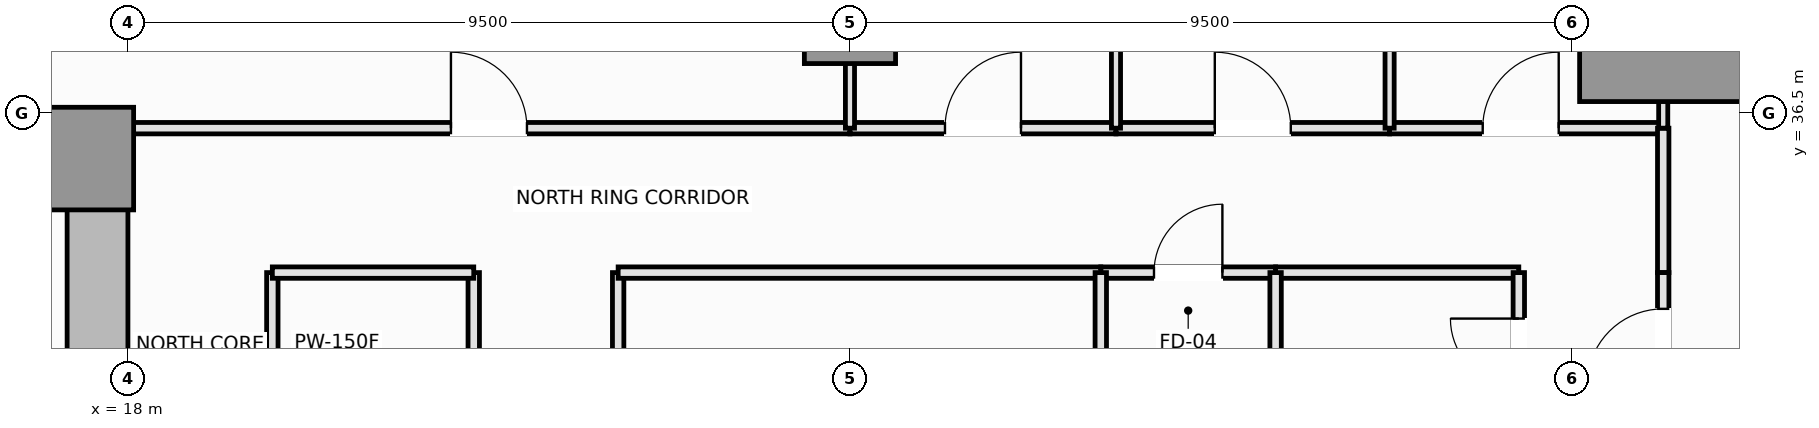
"""IFC4 building model, lengths in metres.
Left out: names, types, materials, properties, quantities, classifications, styles, units other than length and angle.
Written with IfcOpenShell. Run it as: python <this file> out.ifc"""

import sys

from ifc_helpers import new_model, si_unit, direction, frame, frame_2d, origin, origin_2d, place, context, subcontext, project, spatial, rectangle, extrude, element, fill, save


model = new_model("IFC4")
c1 = context("Model", 3, precision=1e-05, world=origin(), true_north=direction((0.0, 1.0)))
c2 = subcontext(c1, "Body", "Model", "MODEL_VIEW")
j1 = project(units=[si_unit("LENGTHUNIT", "METRE"), si_unit("PLANEANGLEUNIT", "RADIAN")], contexts=[c1])
p1 = place(None, origin())
s1 = spatial("IfcSite", under=j1, at=p1, CompositionType="ELEMENT")
p2 = place(p1, origin())
s2 = spatial("IfcBuilding", under=s1, at=p2, CompositionType="ELEMENT")
p3 = place(p2, frame((0.0, 0.0, 82.4)))
s3 = spatial("IfcBuildingStorey", under=s2, at=p3, CompositionType="ELEMENT", Elevation=82.4)
p4 = place(p3, frame((4.5, 36.1, 0.0), z_axis=(0.0, 0.0, 1.0), x_axis=(1.0, 0.0, 0.0)))
e1 = element("IfcWall", 1, at=p4, inside=s3, PredefinedType="SHEAR", context=c2, shape_type="SweptSolid", body=[
    extrude(rectangle(XDim=13.5, YDim=0.8, at=frame_2d((6.75, 0.0))), origin(), (0.0, 0.0, 1.0), 3.55),
])
p5 = place(p3, frame((17.6, 27.05, 0.0), z_axis=(0.0, 0.0, 1.0), x_axis=(0.0, 1.0, 0.0)))
e2 = element("IfcWall", 2, at=p5, inside=s3, PredefinedType="SHEAR", context=c2, shape_type="SweptSolid", body=[
    extrude(rectangle(XDim=8.65, YDim=0.8, at=frame_2d((4.325, 0.0))), origin(), (0.0, 0.0, 1.0), 3.55),
])
p6 = place(p5, frame((3.45, 0.0, 0.0)))
e3 = element("IfcOpeningElement", 3, at=p6, cuts=e2, PredefinedType="OPENING", context=c2, shape_type="SweptSolid", body=[
    extrude(rectangle(XDim=1.1, YDim=2.15, at=frame_2d((0.55, 1.075))), frame((0.0, 0.41, 0.0), z_axis=(0.0, -1.0, 0.0), x_axis=(1.0, 0.0, 0.0)), (0.0, 0.0, 1.0), 0.82),
])
p7 = place(p3, frame((17.4, 35.9, 0.0), z_axis=(0.0, 0.0, 1.0), x_axis=(1.0, 0.0, 0.0)))
e4 = element("IfcColumn", 4, at=p7, inside=s3, PredefinedType="PILASTER", context=c2, shape_type="SweptSolid", body=[
    extrude(rectangle(XDim=1.35, YDim=1.35, at=origin_2d()), origin(), (0.0, 0.0, 1.0), 3.55),
])
p8 = place(p3, frame((38.2, 37.75, 0.0), z_axis=(0.0, 0.0, 1.0), x_axis=(1.0, 0.0, 0.0)))
e5 = element("IfcColumn", 5, at=p8, inside=s3, PredefinedType="COLUMN", context=c2, shape_type="SweptSolid", body=[
    extrude(rectangle(XDim=2.2, YDim=2.2, at=origin_2d()), origin(), (0.0, 0.0, 1.0), 3.55),
])
p9 = place(p3, frame((27.5, 37.75, 0.0), z_axis=(0.0, 0.0, 1.0), x_axis=(1.0, 0.0, 0.0)))
e6 = element("IfcColumn", 6, at=p9, inside=s3, PredefinedType="COLUMN", context=c2, shape_type="SweptSolid", body=[
    extrude(rectangle(XDim=1.2, YDim=1.2, at=origin_2d()), origin(), (0.0, 0.0, 1.0), 3.55),
])
p10 = place(p3, frame((22.55, 29.75, 0.0), z_axis=(0.0, 0.0, 1.0), x_axis=(0.0, 1.0, 0.0)))
e7 = element("IfcWall", 7, at=p10, inside=s3, PredefinedType="PARTITIONING", context=c2, shape_type="SweptSolid", body=[
    extrude(rectangle(XDim=4.65, YDim=0.15, at=frame_2d((2.325, 0.0))), origin(), (0.0, 0.0, 1.0), 3.01),
])
p11 = place(p10, frame((1.825, 0.0, 0.0)))
e8 = element("IfcOpeningElement", 8, at=p11, cuts=e7, PredefinedType="OPENING", context=c2, shape_type="SweptSolid", body=[
    extrude(rectangle(XDim=1.0, YDim=2.15, at=frame_2d((0.5, 1.075))), frame((0.0, 0.085, 0.0), z_axis=(0.0, -1.0, 0.0), x_axis=(1.0, 0.0, 0.0)), (0.0, 0.0, 1.0), 0.17),
])
p12 = place(p3, frame((24.45, 31.3, 0.0), z_axis=(0.0, 0.0, 1.0), x_axis=(0.0, 1.0, 0.0)))
e9 = element("IfcWall", 9, at=p12, inside=s3, PredefinedType="PARTITIONING", context=c2, shape_type="SweptSolid", body=[
    extrude(rectangle(XDim=3.1, YDim=0.15, at=frame_2d((1.55, 0.0))), origin(), (0.0, 0.0, 1.0), 3.37),
])
p13 = place(p12, frame((1.05, 0.0, 0.0)))
e10 = element("IfcOpeningElement", 10, at=p13, cuts=e9, PredefinedType="OPENING", context=c2, shape_type="SweptSolid", body=[
    extrude(rectangle(XDim=1.0, YDim=2.15, at=frame_2d((0.5, 1.075))), frame((0.0, 0.085, 0.0), z_axis=(0.0, -1.0, 0.0), x_axis=(1.0, 0.0, 0.0)), (0.0, 0.0, 1.0), 0.17),
])
p14 = place(p3, frame((19.9, 29.75, 0.0), z_axis=(0.0, 0.0, 1.0), x_axis=(0.0, 1.0, 0.0)))
e11 = element("IfcWall", 11, at=p14, inside=s3, PredefinedType="PARTITIONING", context=c2, shape_type="SweptSolid", body=[
    extrude(rectangle(XDim=4.65, YDim=0.15, at=frame_2d((2.325, 0.0))), origin(), (0.0, 0.0, 1.0), 3.37),
])
p15 = place(p3, frame((19.9, 34.4, 0.0), z_axis=(0.0, 0.0, 1.0), x_axis=(1.0, 0.0, 0.0)))
e12 = element("IfcWall", 12, at=p15, inside=s3, PredefinedType="PARTITIONING", context=c2, shape_type="SweptSolid", body=[
    extrude(rectangle(XDim=2.65, YDim=0.15, at=frame_2d((1.325, 0.0))), origin(), (0.0, 0.0, 1.0), 3.37),
])
p16 = place(p3, frame((33.1, 34.4, 0.0), z_axis=(0.0, 0.0, 1.0), x_axis=(1.0, 0.0, 0.0)))
e13 = element("IfcWall", 13, at=p16, inside=s3, PredefinedType="PLUMBINGWALL", context=c2, shape_type="SweptSolid", body=[
    extrude(rectangle(XDim=3.2, YDim=0.15, at=frame_2d((1.6, 0.0))), origin(), (0.0, 0.0, 1.0), 3.37),
])
p17 = place(p3, frame((30.8, 34.4, 0.0), z_axis=(0.0, 0.0, 1.0), x_axis=(1.0, 0.0, 0.0)))
e14 = element("IfcWall", 14, at=p17, inside=s3, PredefinedType="PLUMBINGWALL", context=c2, shape_type="SweptSolid", body=[
    extrude(rectangle(XDim=2.3, YDim=0.15, at=frame_2d((1.15, 0.0))), origin(), (0.0, 0.0, 1.0), 3.37),
])
p18 = place(p17, frame((0.7, 0.0, 0.0)))
e15 = element("IfcOpeningElement", 15, at=p18, cuts=e14, PredefinedType="OPENING", context=c2, shape_type="SweptSolid", body=[
    extrude(rectangle(XDim=0.9, YDim=2.1, at=frame_2d((0.45, 1.05))), frame((0.0, 0.085, 0.0), z_axis=(0.0, -1.0, 0.0), x_axis=(1.0, 0.0, 0.0)), (0.0, 0.0, 1.0), 0.17),
])
p19 = place(p3, frame((24.45, 34.4, 0.0), z_axis=(0.0, 0.0, 1.0), x_axis=(1.0, 0.0, 0.0)))
e16 = element("IfcWall", 16, at=p19, inside=s3, PredefinedType="PARTITIONING", context=c2, shape_type="SweptSolid", body=[
    extrude(rectangle(XDim=6.35, YDim=0.15, at=frame_2d((3.175, 0.0))), origin(), (0.0, 0.0, 1.0), 3.37),
])
p20 = place(p3, frame((18.0, 36.3, 0.0), z_axis=(0.0, 0.0, 1.0), x_axis=(1.0, 0.0, 0.0)))
e17 = element("IfcWall", 17, at=p20, inside=s3, PredefinedType="PARTITIONING", context=c2, shape_type="SweptSolid", body=[
    extrude(rectangle(XDim=9.5, YDim=0.15, at=frame_2d((4.75, 0.0))), origin(), (0.0, 0.0, 1.0), 3.37),
])
p21 = place(p20, frame((4.25, 0.0, 0.0)))
e18 = element("IfcOpeningElement", 18, at=p21, cuts=e17, PredefinedType="OPENING", context=c2, shape_type="SweptSolid", body=[
    extrude(rectangle(XDim=1.0, YDim=2.15, at=frame_2d((0.5, 1.075))), frame((0.0, 0.085, 0.0), z_axis=(0.0, -1.0, 0.0), x_axis=(1.0, 0.0, 0.0)), (0.0, 0.0, 1.0), 0.17),
])
p22 = place(p3, frame((27.5, 36.3, 0.0), z_axis=(0.0, 0.0, 1.0), x_axis=(1.0, 0.0, 0.0)))
e19 = element("IfcWall", 19, at=p22, inside=s3, PredefinedType="PARTITIONING", context=c2, shape_type="SweptSolid", body=[
    extrude(rectangle(XDim=3.5, YDim=0.15, at=frame_2d((1.75, 0.0))), origin(), (0.0, 0.0, 1.0), 3.37),
])
p23 = place(p22, frame((1.25, 0.0, 0.0)))
e20 = element("IfcOpeningElement", 20, at=p23, cuts=e19, PredefinedType="OPENING", context=c2, shape_type="SweptSolid", body=[
    extrude(rectangle(XDim=1.0, YDim=2.15, at=frame_2d((0.5, 1.075))), frame((0.0, 0.085, 0.0), z_axis=(0.0, -1.0, 0.0), x_axis=(1.0, 0.0, 0.0)), (0.0, 0.0, 1.0), 0.17),
])
p24 = place(p3, frame((31.0, 36.3, 0.0), z_axis=(0.0, 0.0, 1.0), x_axis=(1.0, 0.0, 0.0)))
e21 = element("IfcWall", 21, at=p24, inside=s3, PredefinedType="PARTITIONING", context=c2, shape_type="SweptSolid", body=[
    extrude(rectangle(XDim=3.6, YDim=0.15, at=frame_2d((1.8, 0.0))), origin(), (0.0, 0.0, 1.0), 3.37),
])
p25 = place(p24, frame((1.3, 0.0, 0.0)))
e22 = element("IfcOpeningElement", 22, at=p25, cuts=e21, PredefinedType="OPENING", context=c2, shape_type="SweptSolid", body=[
    extrude(rectangle(XDim=1.0, YDim=2.15, at=frame_2d((0.5, 1.075))), frame((0.0, 0.085, 0.0), z_axis=(0.0, -1.0, 0.0), x_axis=(1.0, 0.0, 0.0)), (0.0, 0.0, 1.0), 0.17),
])
p26 = place(p3, frame((34.6, 36.3, 0.0), z_axis=(0.0, 0.0, 1.0), x_axis=(1.0, 0.0, 0.0)))
e23 = element("IfcWall", 23, at=p26, inside=s3, PredefinedType="PARTITIONING", context=c2, shape_type="SweptSolid", body=[
    extrude(rectangle(XDim=3.6, YDim=0.15, at=frame_2d((1.8, 0.0))), origin(), (0.0, 0.0, 1.0), 3.37),
])
p27 = place(p26, frame((1.225, 0.0, 0.0)))
e24 = element("IfcOpeningElement", 24, at=p27, cuts=e23, PredefinedType="OPENING", context=c2, shape_type="SweptSolid", body=[
    extrude(rectangle(XDim=1.0, YDim=2.15, at=frame_2d((0.5, 1.075))), frame((0.0, 0.085, 0.0), z_axis=(0.0, -1.0, 0.0), x_axis=(1.0, 0.0, 0.0)), (0.0, 0.0, 1.0), 0.17),
])
p28 = place(p3, frame((38.2, 34.4, 0.0), z_axis=(0.0, 0.0, 1.0), x_axis=(0.0, 1.0, 0.0)))
e25 = element("IfcWall", 25, at=p28, inside=s3, PredefinedType="PARTITIONING", context=c2, shape_type="SweptSolid", body=[
    extrude(rectangle(XDim=1.9, YDim=0.15, at=frame_2d((0.95, 0.0))), origin(), (0.0, 0.0, 1.0), 2.82),
])
p29 = place(p3, frame((36.3, 31.3, 0.0), z_axis=(0.0, 0.0, 1.0), x_axis=(0.0, 1.0, 0.0)))
e26 = element("IfcWall", 26, at=p29, inside=s3, PredefinedType="PLUMBINGWALL", context=c2, shape_type="SweptSolid", body=[
    extrude(rectangle(XDim=3.1, YDim=0.15, at=frame_2d((1.55, 0.0))), origin(), (0.0, 0.0, 1.0), 3.37),
])
p30 = place(p29, frame((1.595, 0.0, 0.0)))
e27 = element("IfcOpeningElement", 27, at=p30, cuts=e26, PredefinedType="OPENING", context=c2, shape_type="SweptSolid", body=[
    extrude(rectangle(XDim=0.9, YDim=2.1, at=frame_2d((0.45, 1.05))), frame((0.0, 0.085, 0.0), z_axis=(0.0, -1.0, 0.0), x_axis=(1.0, 0.0, 0.0)), (0.0, 0.0, 1.0), 0.17),
])
p31 = place(p3, frame((38.2, 32.0, 0.0), z_axis=(0.0, 0.0, 1.0), x_axis=(0.0, 1.0, 0.0)))
e28 = element("IfcWall", 28, at=p31, inside=s3, PredefinedType="PARTITIONING", context=c2, shape_type="SweptSolid", body=[
    extrude(rectangle(XDim=2.4, YDim=0.15, at=frame_2d((1.2, 0.0))), origin(), (0.0, 0.0, 1.0), 2.82),
])
p32 = place(p31, frame((0.923, 0.0, 0.0)))
e29 = element("IfcOpeningElement", 29, at=p32, cuts=e28, PredefinedType="OPENING", context=c2, shape_type="SweptSolid", body=[
    extrude(rectangle(XDim=1.0, YDim=2.15, at=frame_2d((0.5, 1.075))), frame((0.0, 0.085, 0.0), z_axis=(0.0, -1.0, 0.0), x_axis=(1.0, 0.0, 0.0)), (0.0, 0.0, 1.0), 0.17),
])
for number, where, z_axis, x_axis in (
    (30, (33.1, 31.3, 0.0), (0.0, 0.0, 1.0), (0.0, 1.0, 0.0)),
    (31, (30.8, 31.3, 0.0), (0.0, 0.0, 1.0), (0.0, 1.0, 0.0)),
):
    element("IfcWall", number, at=place(p3, frame(where, z_axis=z_axis, x_axis=x_axis)), inside=s3, PredefinedType="PLUMBINGWALL", context=c2, shape_type="SweptSolid", body=[
        extrude(rectangle(XDim=3.1, YDim=0.15, at=frame_2d((1.55, 0.0))), origin(), (0.0, 0.0, 1.0), 3.37),
    ])
p33 = place(p3, frame((27.5, 36.3, 0.0), z_axis=(0.0, 0.0, 1.0), x_axis=(0.0, 1.0, 0.0)))
e32 = element("IfcWall", 32, at=p33, inside=s3, PredefinedType="PARTITIONING", context=c2, shape_type="SweptSolid", body=[
    extrude(rectangle(XDim=11.69, YDim=0.12, at=frame_2d((5.845, 0.0))), origin(), (0.0, 0.0, 1.0), 2.82),
])
for number, where, z_axis, x_axis in (
    (33, (31.0, 36.3, 0.0), (0.0, 0.0, 1.0), (0.0, 1.0, 0.0)),
    (34, (34.6, 36.3, 0.0), (0.0, 0.0, 1.0), (0.0, 1.0, 0.0)),
):
    element("IfcWall", number, at=place(p3, frame(where, z_axis=z_axis, x_axis=x_axis)), inside=s3, PredefinedType="PARTITIONING", context=c2, shape_type="SweptSolid", body=[
        extrude(rectangle(XDim=11.69, YDim=0.12, at=frame_2d((5.845, 0.0))), origin(), (0.0, 0.0, 1.0), 3.37),
    ])
p34 = place(p3, frame((38.2, 36.3, 0.0), z_axis=(0.0, 0.0, 1.0), x_axis=(0.0, 1.0, 0.0)))
e35 = element("IfcWall", 35, at=p34, inside=s3, PredefinedType="PARTITIONING", context=c2, shape_type="SweptSolid", body=[
    extrude(rectangle(XDim=11.69, YDim=0.12, at=frame_2d((5.845, 0.0))), origin(), (0.0, 0.0, 1.0), 2.82),
])
p35 = place(p18, origin())
e36 = element("IfcDoor", 36, at=p35, inside=s3, OperationType="SINGLE_SWING_RIGHT", PredefinedType="DOOR", context=c2, shape_type="SweptSolid", body=[
    extrude(rectangle(XDim=0.9, YDim=2.1, at=frame_2d((0.45, 1.05))), frame((0.0, 0.025, 0.0), z_axis=(0.0, -1.0, 0.0), x_axis=(1.0, 0.0, 0.0)), (0.0, 0.0, 1.0), 0.05),
])
fill(e15, e36)
p36 = place(p21, origin())
e37 = element("IfcDoor", 37, at=p36, inside=s3, OperationType="SINGLE_SWING_LEFT", PredefinedType="DOOR", context=c2, shape_type="SweptSolid", body=[
    extrude(rectangle(XDim=1.0, YDim=2.15, at=frame_2d((0.5, 1.075))), frame((0.0, 0.025, 0.0), z_axis=(0.0, -1.0, 0.0), x_axis=(1.0, 0.0, 0.0)), (0.0, 0.0, 1.0), 0.05),
])
fill(e18, e37)
p37 = place(p23, origin())
e38 = element("IfcDoor", 38, at=p37, inside=s3, OperationType="SINGLE_SWING_RIGHT", PredefinedType="DOOR", context=c2, shape_type="SweptSolid", body=[
    extrude(rectangle(XDim=1.0, YDim=2.15, at=frame_2d((0.5, 1.075))), frame((0.0, 0.025, 0.0), z_axis=(0.0, -1.0, 0.0), x_axis=(1.0, 0.0, 0.0)), (0.0, 0.0, 1.0), 0.05),
])
fill(e20, e38)
p38 = place(p25, origin())
e39 = element("IfcDoor", 39, at=p38, inside=s3, OperationType="SINGLE_SWING_LEFT", PredefinedType="DOOR", context=c2, shape_type="SweptSolid", body=[
    extrude(rectangle(XDim=1.0, YDim=2.15, at=frame_2d((0.5, 1.075))), frame((0.0, 0.025, 0.0), z_axis=(0.0, -1.0, 0.0), x_axis=(1.0, 0.0, 0.0)), (0.0, 0.0, 1.0), 0.05),
])
fill(e22, e39)
p39 = place(p27, origin())
e40 = element("IfcDoor", 40, at=p39, inside=s3, OperationType="SINGLE_SWING_RIGHT", PredefinedType="DOOR", context=c2, shape_type="SweptSolid", body=[
    extrude(rectangle(XDim=1.0, YDim=2.15, at=frame_2d((0.5, 1.075))), frame((0.0, 0.025, 0.0), z_axis=(0.0, -1.0, 0.0), x_axis=(1.0, 0.0, 0.0)), (0.0, 0.0, 1.0), 0.05),
])
fill(e24, e40)
p40 = place(p30, origin())
e41 = element("IfcDoor", 41, at=p40, inside=s3, OperationType="SINGLE_SWING_RIGHT", PredefinedType="DOOR", context=c2, shape_type="SweptSolid", body=[
    extrude(rectangle(XDim=0.9, YDim=2.1, at=frame_2d((0.45, 1.05))), frame((0.0, 0.025, 0.0), z_axis=(0.0, -1.0, 0.0), x_axis=(1.0, 0.0, 0.0)), (0.0, 0.0, 1.0), 0.05),
])
fill(e27, e41)
p41 = place(p32, origin())
e42 = element("IfcDoor", 42, at=p41, inside=s3, OperationType="SINGLE_SWING_LEFT", PredefinedType="DOOR", context=c2, shape_type="SweptSolid", body=[
    extrude(rectangle(XDim=1.0, YDim=2.15, at=frame_2d((0.5, 1.075))), frame((0.0, 0.025, 0.0), z_axis=(0.0, -1.0, 0.0), x_axis=(1.0, 0.0, 0.0)), (0.0, 0.0, 1.0), 0.05),
])
fill(e29, e42)
save(model, sys.argv[1])
